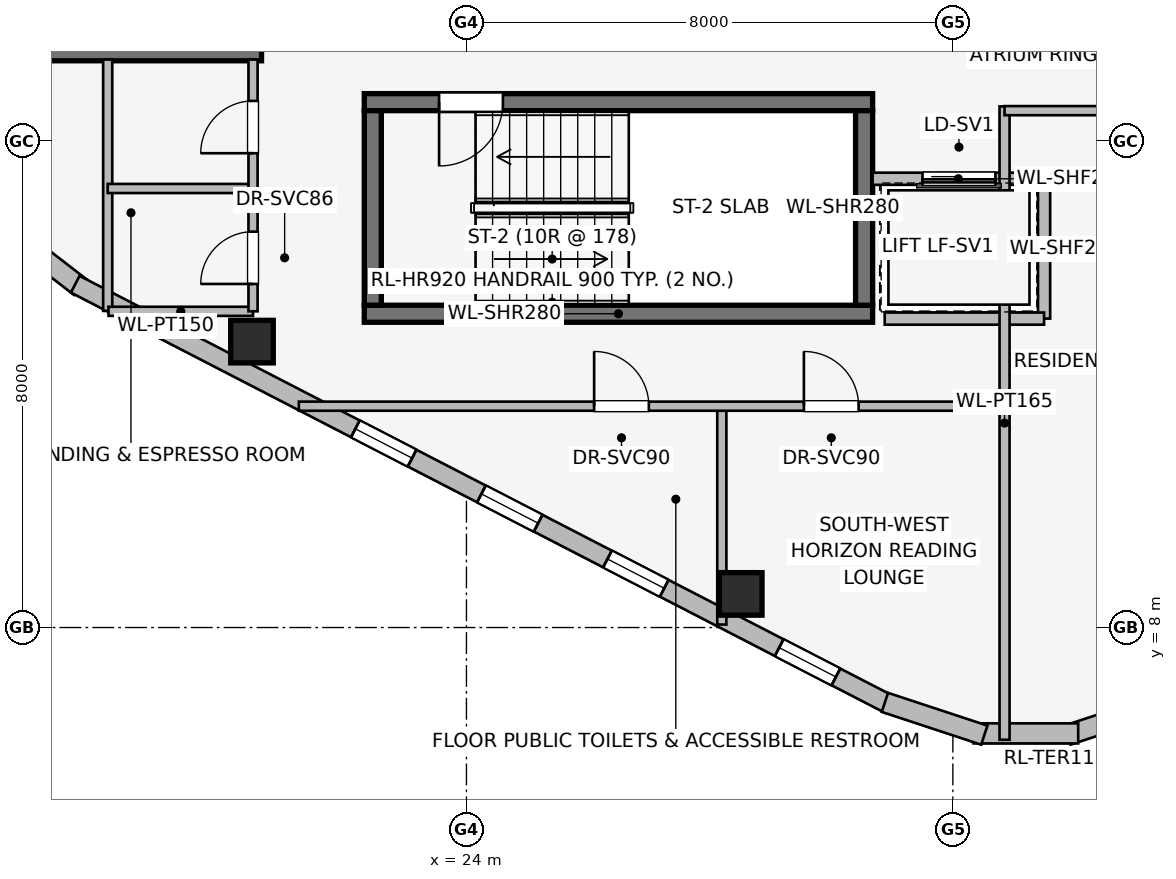
"""IFC4 building model, lengths in metres.
Left out: names, types, materials, properties, quantities, classifications, styles, units other than length and angle.
Written with IfcOpenShell. Run it as: python <this file> out.ifc"""

import sys

from ifc_helpers import new_model, si_unit, direction, frame, frame_2d, origin, origin_2d, place, context, subcontext, project, spatial, rectangle, extrude, element, fill, save


model = new_model("IFC4")
c1 = context("Model", 3, precision=1e-05, world=origin(), true_north=direction((0.0, 1.0)))
c2 = subcontext(c1, "Body", "Model", "MODEL_VIEW")
j1 = project(units=[si_unit("LENGTHUNIT", "METRE"), si_unit("PLANEANGLEUNIT", "RADIAN")], contexts=[c1])
p1 = place(None, origin())
s1 = spatial("IfcSite", under=j1, at=p1, CompositionType="ELEMENT")
p2 = place(p1, origin())
s2 = spatial("IfcBuilding", under=s1, at=p2, CompositionType="ELEMENT")
p3 = place(p2, frame((0.0, 0.0, 238.35)))
s3 = spatial("IfcBuildingStorey", under=s2, at=p3, CompositionType="ELEMENT", Elevation=238.35)
p4 = place(p3, frame((16.87, 17.46, 0.0), z_axis=(0.0, 0.0, 1.0), x_axis=(1.0, 0.0, 0.0)))
e1 = element("IfcWall", 1, at=p4, inside=s3, PredefinedType="SHEAR", context=c2, shape_type="SweptSolid", body=[
    extrude(rectangle(XDim=3.76, YDim=0.28, at=frame_2d((1.88, 0.0))), origin(), (0.0, 0.0, 1.0), 3.55),
])
p5 = place(p3, frame((22.32, 13.16, 0.0), z_axis=(0.0, 0.0, 1.0), x_axis=(1.0, 0.0, 0.0)))
e2 = element("IfcWall", 2, at=p5, inside=s3, PredefinedType="SHEAR", context=c2, shape_type="SweptSolid", body=[
    extrude(rectangle(XDim=8.36, YDim=0.28, at=frame_2d((4.18, 0.0))), origin(), (0.0, 0.0, 1.0), 3.55),
])
p6 = place(p3, frame((30.68, 16.64, 0.0), z_axis=(0.0, 0.0, 1.0), x_axis=(-1.0, 0.0, 0.0)))
e3 = element("IfcWall", 3, at=p6, inside=s3, PredefinedType="SHEAR", context=c2, shape_type="SweptSolid", body=[
    extrude(rectangle(XDim=8.36, YDim=0.28, at=frame_2d((4.18, 0.0))), origin(), (0.0, 0.0, 1.0), 3.55),
])
p7 = place(p6, frame((6.08, 0.0, 0.0)))
e4 = element("IfcOpeningElement", 4, at=p7, cuts=e3, PredefinedType="OPENING", context=c2, shape_type="SweptSolid", body=[
    extrude(rectangle(XDim=1.05, YDim=2.0, at=frame_2d((0.525, 1.0))), frame((0.0, 0.15, 0.0), z_axis=(0.0, -1.0, 0.0), x_axis=(1.0, 0.0, 0.0)), (0.0, 0.0, 1.0), 0.3),
])
for number, where, z_axis, x_axis in (
    (5, (22.46, 16.5, 0.0), (0.0, 0.0, 1.0), (0.0, -1.0, 0.0)),
    (6, (30.54, 13.3, 0.0), (0.0, 0.0, 1.0), (0.0, 1.0, 0.0)),
):
    element("IfcWall", number, at=place(p3, frame(where, z_axis=z_axis, x_axis=x_axis)), inside=s3, PredefinedType="SHEAR", context=c2, shape_type="SweptSolid", body=[
        extrude(rectangle(XDim=3.2, YDim=0.28, at=frame_2d((1.6, 0.0))), origin(), (0.0, 0.0, 1.0), 3.55),
    ])
for number, where, z_axis, x_axis in (
    (7, (20.473, 12.702, 0.0), (0.0, 0.0, 1.0), (1.0, 0.0, 0.0)),
    (8, (28.511, 8.553, 0.0), (0.0, 0.0, 1.0), (1.0, 0.0, 0.0)),
):
    element("IfcColumn", number, at=place(p3, frame(where, z_axis=z_axis, x_axis=x_axis)), inside=s3, PredefinedType="COLUMN", context=c2, shape_type="SweptSolid", body=[
        extrude(rectangle(XDim=0.7, YDim=0.7, at=origin_2d()), origin(), (0.0, 0.0, 1.0), 3.55),
    ])
p8 = place(p3, frame((17.647, 13.599, 0.0), z_axis=(0.0, 0.0, 1.0), x_axis=(-0.790691856293, 0.61221433207, 0.0)))
e9 = element("IfcWall", 9, at=p8, inside=s3, PredefinedType="STANDARD", context=c2, shape_type="SweptSolid", body=[
    extrude(rectangle(XDim=1.676, YDim=0.33, at=frame_2d((0.838, 0.0))), origin(), (0.0, 0.0, 1.0), 3.26),
])
p9 = place(p3, frame((30.963, 6.73, 0.0), z_axis=(0.0, 0.0, 1.0), x_axis=(-0.888581481622, 0.458718814218, 0.0)))
e10 = element("IfcWall", 10, at=p9, inside=s3, PredefinedType="STANDARD", context=c2, shape_type="SweptSolid", body=[
    extrude(rectangle(XDim=15.077, YDim=0.31, at=frame_2d((7.539, 0.0))), origin(), (0.0, 0.0, 1.0), 3.26),
])
p10 = place(p9, frame((0.998, 0.0, 0.75)))
e11 = element("IfcOpeningElement", 11, at=p10, cuts=e10, PredefinedType="OPENING", context=c2, shape_type="SweptSolid", body=[
    extrude(rectangle(XDim=1.05, YDim=1.4, at=frame_2d((0.525, 0.7))), frame((0.0, 0.165, 0.0), z_axis=(0.0, -1.0, 0.0), x_axis=(1.0, 0.0, 0.0)), (0.0, 0.0, 1.0), 0.33),
])
p11 = place(p9, frame((4.176, 0.0, 0.75)))
e12 = element("IfcOpeningElement", 12, at=p11, cuts=e10, PredefinedType="OPENING", context=c2, shape_type="SweptSolid", body=[
    extrude(rectangle(XDim=1.05, YDim=1.4, at=frame_2d((0.525, 0.7))), frame((0.0, 0.165, 0.0), z_axis=(0.0, -1.0, 0.0), x_axis=(1.0, 0.0, 0.0)), (0.0, 0.0, 1.0), 0.33),
])
p12 = place(p9, frame((6.509, 0.0, 0.75)))
e13 = element("IfcOpeningElement", 13, at=p12, cuts=e10, PredefinedType="OPENING", context=c2, shape_type="SweptSolid", body=[
    extrude(rectangle(XDim=1.05, YDim=1.4, at=frame_2d((0.525, 0.7))), frame((0.0, 0.165, 0.0), z_axis=(0.0, -1.0, 0.0), x_axis=(1.0, 0.0, 0.0)), (0.0, 0.0, 1.0), 0.33),
])
p13 = place(p9, frame((8.842, 0.0, 0.75)))
e14 = element("IfcOpeningElement", 14, at=p13, cuts=e10, PredefinedType="OPENING", context=c2, shape_type="SweptSolid", body=[
    extrude(rectangle(XDim=1.05, YDim=1.4, at=frame_2d((0.525, 0.7))), frame((0.0, 0.165, 0.0), z_axis=(0.0, -1.0, 0.0), x_axis=(1.0, 0.0, 0.0)), (0.0, 0.0, 1.0), 0.33),
])
p14 = place(p3, frame((35.518, 6.769, 0.0), z_axis=(0.0, 0.0, 1.0), x_axis=(-0.949713440491, -0.313120393699, 0.0)))
e15 = element("IfcWall", 15, at=p14, inside=s3, PredefinedType="STANDARD", context=c2, shape_type="SweptSolid", body=[
    extrude(rectangle(XDim=1.722, YDim=0.33, at=frame_2d((0.861, 0.0))), origin(), (0.0, 0.0, 1.0), 3.26),
])
p15 = place(p3, frame((34.061, 6.259, 0.0), z_axis=(0.0, 0.0, 1.0), x_axis=(-1.0, 0.0, 0.0)))
e16 = element("IfcWall", 16, at=p15, inside=s3, PredefinedType="STANDARD", context=c2, shape_type="SweptSolid", body=[
    extrude(rectangle(XDim=1.722, YDim=0.33, at=frame_2d((0.861, 0.0))), origin(), (0.0, 0.0, 1.0), 3.26),
])
p16 = place(p3, frame((32.517, 6.23, 0.0), z_axis=(0.0, 0.0, 1.0), x_axis=(-0.949713440491, 0.313120393699, 0.0)))
e17 = element("IfcWall", 17, at=p16, inside=s3, PredefinedType="STANDARD", context=c2, shape_type="SweptSolid", body=[
    extrude(rectangle(XDim=1.722, YDim=0.33, at=frame_2d((0.861, 0.0))), origin(), (0.0, 0.0, 1.0), 3.26),
])
p17 = place(p3, frame((33.5, 15.38, 0.0), z_axis=(0.0, 0.0, 1.0), x_axis=(-1.0, 0.0, 0.0)))
e18 = element("IfcWall", 18, at=p17, inside=s3, PredefinedType="PARTITIONING", context=c2, shape_type="SweptSolid", body=[
    extrude(rectangle(XDim=2.82, YDim=0.2, at=frame_2d((1.41, 0.0))), origin(), (0.0, 0.0, 1.0), 3.26),
])
p18 = place(p17, frame((0.8, 0.0, 0.0)))
e19 = element("IfcOpeningElement", 19, at=p18, cuts=e18, PredefinedType="OPENING", context=c2, shape_type="SweptSolid", body=[
    extrude(rectangle(XDim=1.2, YDim=2.2, at=frame_2d((0.6, 1.1))), frame((0.0, 0.11, 0.0), z_axis=(0.0, -1.0, 0.0), x_axis=(1.0, 0.0, 0.0)), (0.0, 0.0, 1.0), 0.22),
])
p19 = place(p3, frame((33.5, 13.08, 0.0), z_axis=(0.0, 0.0, 1.0), x_axis=(0.0, 1.0, 0.0)))
e20 = element("IfcWall", 20, at=p19, inside=s3, PredefinedType="PARTITIONING", context=c2, shape_type="SweptSolid", body=[
    extrude(rectangle(XDim=2.3, YDim=0.2, at=frame_2d((1.15, 0.0))), origin(), (0.0, 0.0, 1.0), 3.26),
])
p20 = place(p3, frame((30.879, 13.08, 0.0), z_axis=(0.0, 0.0, 1.0), x_axis=(1.0, 0.0, 0.0)))
e21 = element("IfcWall", 21, at=p20, inside=s3, PredefinedType="PARTITIONING", context=c2, shape_type="SweptSolid", body=[
    extrude(rectangle(XDim=2.621, YDim=0.2, at=frame_2d((1.311, 0.0))), origin(), (0.0, 0.0, 1.0), 3.26),
])
p21 = place(p3, frame((18.1, 17.34, 0.0), z_axis=(0.0, 0.0, 1.0), x_axis=(0.0, -1.0, 0.0)))
e22 = element("IfcWall", 22, at=p21, inside=s3, PredefinedType="PARTITIONING", context=c2, shape_type="SweptSolid", body=[
    extrude(rectangle(XDim=4.133, YDim=0.15, at=frame_2d((2.066, 0.0))), origin(), (0.0, 0.0, 1.0), 3.26),
])
p22 = place(p3, frame((18.113, 13.2, 0.0), z_axis=(0.0, 0.0, 1.0), x_axis=(1.0, 0.0, 0.0)))
e23 = element("IfcWall", 23, at=p22, inside=s3, PredefinedType="PARTITIONING", context=c2, shape_type="SweptSolid", body=[
    extrude(rectangle(XDim=2.377, YDim=0.15, at=frame_2d((1.188, 0.0))), origin(), (0.0, 0.0, 1.0), 3.26),
])
p23 = place(p3, frame((18.1, 15.22, 0.0), z_axis=(0.0, 0.0, 1.0), x_axis=(1.0, 0.0, 0.0)))
e24 = element("IfcWall", 24, at=p23, inside=s3, PredefinedType="PARTITIONING", context=c2, shape_type="SweptSolid", body=[
    extrude(rectangle(XDim=2.39, YDim=0.15, at=frame_2d((1.195, 0.0))), origin(), (0.0, 0.0, 1.0), 3.26),
])
p24 = place(p3, frame((20.49, 13.2, 0.0), z_axis=(0.0, 0.0, 1.0), x_axis=(0.0, 1.0, 0.0)))
e25 = element("IfcWall", 25, at=p24, inside=s3, PredefinedType="PARTITIONING", context=c2, shape_type="SweptSolid", body=[
    extrude(rectangle(XDim=4.14, YDim=0.15, at=frame_2d((2.07, 0.0))), origin(), (0.0, 0.0, 1.0), 3.26),
])
p25 = place(p24, frame((0.45, 0.0, 0.0)))
e26 = element("IfcOpeningElement", 26, at=p25, cuts=e25, PredefinedType="OPENING", context=c2, shape_type="SweptSolid", body=[
    extrude(rectangle(XDim=0.86, YDim=2.0, at=frame_2d((0.43, 1.0))), frame((0.0, 0.085, 0.0), z_axis=(0.0, -1.0, 0.0), x_axis=(1.0, 0.0, 0.0)), (0.0, 0.0, 1.0), 0.17),
])
p26 = place(p24, frame((2.6, 0.0, 0.0)))
e27 = element("IfcOpeningElement", 27, at=p26, cuts=e25, PredefinedType="OPENING", context=c2, shape_type="SweptSolid", body=[
    extrude(rectangle(XDim=0.86, YDim=2.0, at=frame_2d((0.43, 1.0))), frame((0.0, 0.085, 0.0), z_axis=(0.0, -1.0, 0.0), x_axis=(1.0, 0.0, 0.0)), (0.0, 0.0, 1.0), 0.17),
])
p27 = place(p3, frame((32.85, 6.154, 0.0), z_axis=(0.0, 0.0, 1.0), x_axis=(0.0, 1.0, 0.0)))
e28 = element("IfcWall", 28, at=p27, inside=s3, PredefinedType="PARTITIONING", context=c2, shape_type="SweptSolid", body=[
    extrude(rectangle(XDim=10.416, YDim=0.165, at=frame_2d((5.208, 0.0))), origin(), (0.0, 0.0, 1.0), 3.26),
])
p28 = place(p3, frame((28.2, 8.049, 0.0), z_axis=(0.0, 0.0, 1.0), x_axis=(0.0, 1.0, 0.0)))
e29 = element("IfcWall", 29, at=p28, inside=s3, PredefinedType="PARTITIONING", context=c2, shape_type="SweptSolid", body=[
    extrude(rectangle(XDim=3.591, YDim=0.15, at=frame_2d((1.795, 0.0))), origin(), (0.0, 0.0, 1.0), 3.26),
])
p29 = place(p3, frame((21.244, 11.64, 0.0), z_axis=(0.0, 0.0, 1.0), x_axis=(1.0, 0.0, 0.0)))
e30 = element("IfcWall", 30, at=p29, inside=s3, PredefinedType="PARTITIONING", context=c2, shape_type="SweptSolid", body=[
    extrude(rectangle(XDim=11.606, YDim=0.15, at=frame_2d((5.803, 0.0))), origin(), (0.0, 0.0, 1.0), 3.26),
])
p30 = place(p29, frame((4.856, 0.0, 0.0)))
e31 = element("IfcOpeningElement", 31, at=p30, cuts=e30, PredefinedType="OPENING", context=c2, shape_type="SweptSolid", body=[
    extrude(rectangle(XDim=0.9, YDim=2.0, at=frame_2d((0.45, 1.0))), frame((0.0, 0.085, 0.0), z_axis=(0.0, -1.0, 0.0), x_axis=(1.0, 0.0, 0.0)), (0.0, 0.0, 1.0), 0.17),
])
p31 = place(p29, frame((8.306, 0.0, 0.0)))
e32 = element("IfcOpeningElement", 32, at=p31, cuts=e30, PredefinedType="OPENING", context=c2, shape_type="SweptSolid", body=[
    extrude(rectangle(XDim=0.9, YDim=2.0, at=frame_2d((0.45, 1.0))), frame((0.0, 0.085, 0.0), z_axis=(0.0, -1.0, 0.0), x_axis=(1.0, 0.0, 0.0)), (0.0, 0.0, 1.0), 0.17),
])
p32 = place(p3, frame((32.85, 16.5, 0.0), z_axis=(0.0, 0.0, 1.0), x_axis=(1.0, 0.0, 0.0)))
e33 = element("IfcWall", 33, at=p32, inside=s3, PredefinedType="PARTITIONING", context=c2, shape_type="SweptSolid", body=[
    extrude(rectangle(XDim=8.61, YDim=0.15, at=frame_2d((4.305, 0.0))), origin(), (0.0, 0.0, 1.0), 3.26),
])
p33 = place(p32, frame((3.825, 0.0, 0.0)))
e34 = element("IfcOpeningElement", 34, at=p33, cuts=e33, PredefinedType="OPENING", context=c2, shape_type="SweptSolid", body=[
    extrude(rectangle(XDim=0.96, YDim=2.0, at=frame_2d((0.48, 1.0))), frame((0.0, 0.085, 0.0), z_axis=(0.0, -1.0, 0.0), x_axis=(1.0, 0.0, 0.0)), (0.0, 0.0, 1.0), 0.17),
])
p34 = place(p10, origin())
e35 = element("IfcWindow", 35, at=p34, inside=s3, PartitioningType="SINGLE_PANEL", PredefinedType="WINDOW", context=c2, shape_type="SweptSolid", body=[
    extrude(rectangle(XDim=1.05, YDim=1.4, at=frame_2d((0.525, 0.7))), frame((0.0, 0.03, 0.0), z_axis=(0.0, -1.0, 0.0), x_axis=(1.0, 0.0, 0.0)), (0.0, 0.0, 1.0), 0.06),
])
fill(e11, e35)
p35 = place(p11, origin())
e36 = element("IfcWindow", 36, at=p35, inside=s3, PartitioningType="SINGLE_PANEL", PredefinedType="WINDOW", context=c2, shape_type="SweptSolid", body=[
    extrude(rectangle(XDim=1.05, YDim=1.4, at=frame_2d((0.525, 0.7))), frame((0.0, 0.03, 0.0), z_axis=(0.0, -1.0, 0.0), x_axis=(1.0, 0.0, 0.0)), (0.0, 0.0, 1.0), 0.06),
])
fill(e12, e36)
p36 = place(p12, origin())
e37 = element("IfcWindow", 37, at=p36, inside=s3, PartitioningType="SINGLE_PANEL", PredefinedType="WINDOW", context=c2, shape_type="SweptSolid", body=[
    extrude(rectangle(XDim=1.05, YDim=1.4, at=frame_2d((0.525, 0.7))), frame((0.0, 0.03, 0.0), z_axis=(0.0, -1.0, 0.0), x_axis=(1.0, 0.0, 0.0)), (0.0, 0.0, 1.0), 0.06),
])
fill(e13, e37)
p37 = place(p13, origin())
e38 = element("IfcWindow", 38, at=p37, inside=s3, PartitioningType="SINGLE_PANEL", PredefinedType="WINDOW", context=c2, shape_type="SweptSolid", body=[
    extrude(rectangle(XDim=1.05, YDim=1.4, at=frame_2d((0.525, 0.7))), frame((0.0, 0.03, 0.0), z_axis=(0.0, -1.0, 0.0), x_axis=(1.0, 0.0, 0.0)), (0.0, 0.0, 1.0), 0.06),
])
fill(e14, e38)
p38 = place(p7, origin())
e39 = element("IfcDoor", 39, at=p38, inside=s3, OperationType="SINGLE_SWING_RIGHT", PredefinedType="DOOR", context=c2, shape_type="SweptSolid", body=[
    extrude(rectangle(XDim=1.05, YDim=2.0, at=frame_2d((0.525, 1.0))), frame((0.0, 0.025, 0.0), z_axis=(0.0, -1.0, 0.0), x_axis=(1.0, 0.0, 0.0)), (0.0, 0.0, 1.0), 0.05),
])
fill(e4, e39)
p39 = place(p18, origin())
e40 = element("IfcDoor", 40, at=p39, inside=s3, OperationType="SLIDING_TO_RIGHT", PredefinedType="DOOR", context=c2, shape_type="SweptSolid", body=[
    extrude(rectangle(XDim=1.2, YDim=2.2, at=frame_2d((0.6, 1.1))), frame((0.0, 0.025, 0.0), z_axis=(0.0, -1.0, 0.0), x_axis=(1.0, 0.0, 0.0)), (0.0, 0.0, 1.0), 0.05),
])
fill(e19, e40)
p40 = place(p25, origin())
e41 = element("IfcDoor", 41, at=p40, inside=s3, OperationType="SINGLE_SWING_LEFT", PredefinedType="DOOR", context=c2, shape_type="SweptSolid", body=[
    extrude(rectangle(XDim=0.86, YDim=2.0, at=frame_2d((0.43, 1.0))), frame((0.0, 0.025, 0.0), z_axis=(0.0, -1.0, 0.0), x_axis=(1.0, 0.0, 0.0)), (0.0, 0.0, 1.0), 0.05),
])
fill(e26, e41)
p41 = place(p26, origin())
e42 = element("IfcDoor", 42, at=p41, inside=s3, OperationType="SINGLE_SWING_LEFT", PredefinedType="DOOR", context=c2, shape_type="SweptSolid", body=[
    extrude(rectangle(XDim=0.86, YDim=2.0, at=frame_2d((0.43, 1.0))), frame((0.0, 0.025, 0.0), z_axis=(0.0, -1.0, 0.0), x_axis=(1.0, 0.0, 0.0)), (0.0, 0.0, 1.0), 0.05),
])
fill(e27, e42)
p42 = place(p30, origin())
e43 = element("IfcDoor", 43, at=p42, inside=s3, OperationType="SINGLE_SWING_LEFT", PredefinedType="DOOR", context=c2, shape_type="SweptSolid", body=[
    extrude(rectangle(XDim=0.9, YDim=2.0, at=frame_2d((0.45, 1.0))), frame((0.0, 0.025, 0.0), z_axis=(0.0, -1.0, 0.0), x_axis=(1.0, 0.0, 0.0)), (0.0, 0.0, 1.0), 0.05),
])
fill(e31, e43)
p43 = place(p31, origin())
e44 = element("IfcDoor", 44, at=p43, inside=s3, OperationType="SINGLE_SWING_LEFT", PredefinedType="DOOR", context=c2, shape_type="SweptSolid", body=[
    extrude(rectangle(XDim=0.9, YDim=2.0, at=frame_2d((0.45, 1.0))), frame((0.0, 0.025, 0.0), z_axis=(0.0, -1.0, 0.0), x_axis=(1.0, 0.0, 0.0)), (0.0, 0.0, 1.0), 0.05),
])
fill(e32, e44)
save(model, sys.argv[1])
